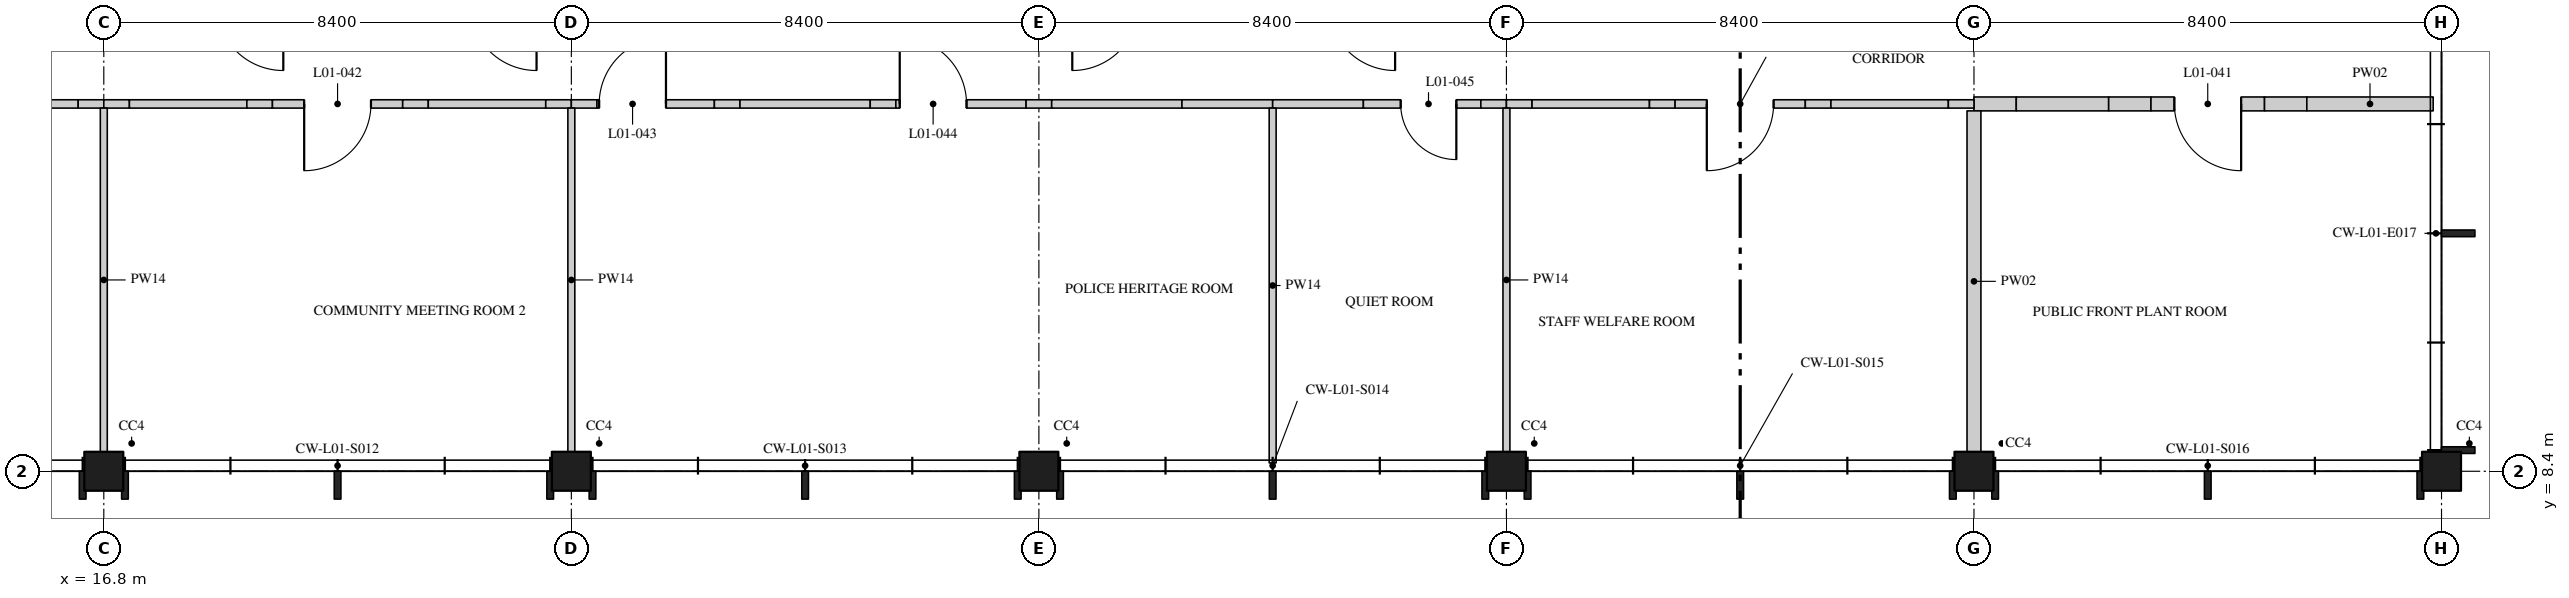
"""IFC4 building model, lengths in metres.
Left out: names, types, materials, properties, quantities, classifications, styles, units other than length and angle.
Written with IfcOpenShell. Run it as: python <this file> out.ifc"""

import sys

from ifc_helpers import new_model, si_unit, direction, frame, frame_2d, origin, origin_2d, place, context, subcontext, project, spatial, rectangle, extrude, element, fill, save


model = new_model("IFC4")
c1 = context("Model", 3, precision=1e-05, world=origin(), true_north=direction((0.0, 1.0)))
c2 = subcontext(c1, "Body", "Model", "MODEL_VIEW")
j1 = project(units=[si_unit("LENGTHUNIT", "METRE"), si_unit("PLANEANGLEUNIT", "RADIAN")], contexts=[c1])
p1 = place(None, origin())
s1 = spatial("IfcSite", under=j1, at=p1, CompositionType="ELEMENT")
p2 = place(p1, origin())
s2 = spatial("IfcBuilding", under=s1, at=p2, CompositionType="ELEMENT")
p3 = place(p2, frame((0.0, 0.0, 5.4)))
s3 = spatial("IfcBuildingStorey", under=s2, at=p3, CompositionType="ELEMENT", Elevation=5.4)
for number, where, z_axis, x_axis in (
    (1, (16.8, 8.4, 0.0), (0.0, 0.0, 1.0), (1.0, 0.0, 0.0)),
    (2, (25.2, 8.4, 0.0), (0.0, 0.0, 1.0), (1.0, 0.0, 0.0)),
    (3, (33.6, 8.4, 0.0), (0.0, 0.0, 1.0), (1.0, 0.0, 0.0)),
    (4, (42.0, 8.4, 0.0), (0.0, 0.0, 1.0), (1.0, 0.0, 0.0)),
    (5, (50.4, 8.4, 0.0), (0.0, 0.0, 1.0), (1.0, 0.0, 0.0)),
    (6, (58.8, 8.4, 0.0), (0.0, 0.0, 1.0), (1.0, 0.0, 0.0)),
):
    element("IfcColumn", number, at=place(p3, frame(where, z_axis=z_axis, x_axis=x_axis)), inside=s3, PredefinedType="COLUMN", context=c2, shape_type="SweptSolid", body=[
        extrude(rectangle(XDim=0.7, YDim=0.7, at=origin_2d()), origin(), (0.0, 0.0, 1.0), 4.37),
    ])
p4 = place(p3, frame((14.23, 15.0, 0.0), z_axis=(0.0, 0.0, 1.0), x_axis=(1.0, 0.0, 0.0)))
e7 = element("IfcWall", 7, at=p4, inside=s3, PredefinedType="PARTITIONING", context=c2, shape_type="SweptSolid", body=[
    extrude(rectangle(XDim=2.11, YDim=0.15, at=frame_2d((1.055, 0.0))), origin(), (0.0, 0.0, 1.0), 4.37),
])
p5 = place(p3, frame((16.34, 15.0, 0.0), z_axis=(0.0, 0.0, 1.0), x_axis=(1.0, 0.0, 0.0)))
e8 = element("IfcWall", 8, at=p5, inside=s3, PredefinedType="PARTITIONING", context=c2, shape_type="SweptSolid", body=[
    extrude(rectangle(XDim=0.46, YDim=0.15, at=frame_2d((0.23, 0.0))), origin(), (0.0, 0.0, 1.0), 3.746),
])
p6 = place(p3, frame((50.4, 15.0, 0.0), z_axis=(0.0, 0.0, 1.0), x_axis=(1.0, 0.0, 0.0)))
e9 = element("IfcWall", 9, at=p6, inside=s3, PredefinedType="PARTITIONING", context=c2, shape_type="SweptSolid", body=[
    extrude(rectangle(XDim=0.76, YDim=0.25, at=frame_2d((0.38, 0.0))), origin(), (0.0, 0.0, 1.0), 3.746),
])
p7 = place(p3, frame((51.16, 15.0, 0.0), z_axis=(0.0, 0.0, 1.0), x_axis=(1.0, 0.0, 0.0)))
e10 = element("IfcWall", 10, at=p7, inside=s3, PredefinedType="PARTITIONING", context=c2, shape_type="SweptSolid", body=[
    extrude(rectangle(XDim=1.66, YDim=0.25, at=frame_2d((0.83, 0.0))), origin(), (0.0, 0.0, 1.0), 4.37),
])
p8 = place(p3, frame((52.82, 15.0, 0.0), z_axis=(0.0, 0.0, 1.0), x_axis=(1.0, 0.0, 0.0)))
e11 = element("IfcWall", 11, at=p8, inside=s3, PredefinedType="PARTITIONING", context=c2, shape_type="SweptSolid", body=[
    extrude(rectangle(XDim=0.76, YDim=0.25, at=frame_2d((0.38, 0.0))), origin(), (0.0, 0.0, 1.0), 3.895),
])
p9 = place(p3, frame((53.58, 15.0, 0.0), z_axis=(0.0, 0.0, 1.0), x_axis=(1.0, 0.0, 0.0)))
e12 = element("IfcWall", 12, at=p9, inside=s3, PredefinedType="PARTITIONING", context=c2, shape_type="SweptSolid", body=[
    extrude(rectangle(XDim=2.04, YDim=0.25, at=frame_2d((1.02, 0.0))), origin(), (0.0, 0.0, 1.0), 4.37),
])
p10 = place(p9, frame((0.42, 0.0, 0.0)))
e13 = element("IfcOpeningElement", 13, at=p10, cuts=e12, PredefinedType="OPENING", context=c2, shape_type="SweptSolid", body=[
    extrude(rectangle(XDim=1.2, YDim=2.4, at=frame_2d((0.6, 1.2))), frame((0.0, 0.135, 0.0), z_axis=(0.0, -1.0, 0.0), x_axis=(1.0, 0.0, 0.0)), (0.0, 0.0, 1.0), 0.27),
])
p11 = place(p3, frame((55.62, 15.0, 0.0), z_axis=(0.0, 0.0, 1.0), x_axis=(1.0, 0.0, 0.0)))
e14 = element("IfcWall", 14, at=p11, inside=s3, PredefinedType="PARTITIONING", context=c2, shape_type="SweptSolid", body=[
    extrude(rectangle(XDim=0.76, YDim=0.25, at=frame_2d((0.38, 0.0))), origin(), (0.0, 0.0, 1.0), 3.895),
])
p12 = place(p3, frame((56.38, 15.0, 0.0), z_axis=(0.0, 0.0, 1.0), x_axis=(1.0, 0.0, 0.0)))
e15 = element("IfcWall", 15, at=p12, inside=s3, PredefinedType="PARTITIONING", context=c2, shape_type="SweptSolid", body=[
    extrude(rectangle(XDim=2.27, YDim=0.25, at=frame_2d((1.135, 0.0))), origin(), (0.0, 0.0, 1.0), 4.37),
])
p13 = place(p3, frame((16.8, 15.0, 0.0), z_axis=(0.0, 0.0, 1.0), x_axis=(1.0, 0.0, 0.0)))
e16 = element("IfcWall", 16, at=p13, inside=s3, PredefinedType="PARTITIONING", context=c2, shape_type="SweptSolid", body=[
    extrude(rectangle(XDim=0.46, YDim=0.15, at=frame_2d((0.23, 0.0))), origin(), (0.0, 0.0, 1.0), 3.746),
])
p14 = place(p3, frame((17.26, 15.0, 0.0), z_axis=(0.0, 0.0, 1.0), x_axis=(1.0, 0.0, 0.0)))
e17 = element("IfcWall", 17, at=p14, inside=s3, PredefinedType="PARTITIONING", context=c2, shape_type="SweptSolid", body=[
    extrude(rectangle(XDim=2.11, YDim=0.15, at=frame_2d((1.055, 0.0))), origin(), (0.0, 0.0, 1.0), 4.37),
])
p15 = place(p3, frame((19.37, 15.0, 0.0), z_axis=(0.0, 0.0, 1.0), x_axis=(1.0, 0.0, 0.0)))
e18 = element("IfcWall", 18, at=p15, inside=s3, PredefinedType="PARTITIONING", context=c2, shape_type="SweptSolid", body=[
    extrude(rectangle(XDim=0.46, YDim=0.15, at=frame_2d((0.23, 0.0))), origin(), (0.0, 0.0, 1.0), 3.895),
])
p16 = place(p3, frame((19.83, 15.0, 0.0), z_axis=(0.0, 0.0, 1.0), x_axis=(1.0, 0.0, 0.0)))
e19 = element("IfcWall", 19, at=p16, inside=s3, PredefinedType="PARTITIONING", context=c2, shape_type="SweptSolid", body=[
    extrude(rectangle(XDim=2.34, YDim=0.15, at=frame_2d((1.17, 0.0))), origin(), (0.0, 0.0, 1.0), 4.37),
])
p17 = place(p16, frame((0.57, 0.0, 0.0)))
e20 = element("IfcOpeningElement", 20, at=p17, cuts=e19, PredefinedType="OPENING", context=c2, shape_type="SweptSolid", body=[
    extrude(rectangle(XDim=1.2, YDim=2.4, at=frame_2d((0.6, 1.2))), frame((0.0, 0.085, 0.0), z_axis=(0.0, -1.0, 0.0), x_axis=(1.0, 0.0, 0.0)), (0.0, 0.0, 1.0), 0.17),
])
p18 = place(p3, frame((22.17, 15.0, 0.0), z_axis=(0.0, 0.0, 1.0), x_axis=(1.0, 0.0, 0.0)))
e21 = element("IfcWall", 21, at=p18, inside=s3, PredefinedType="PARTITIONING", context=c2, shape_type="SweptSolid", body=[
    extrude(rectangle(XDim=0.46, YDim=0.15, at=frame_2d((0.23, 0.0))), origin(), (0.0, 0.0, 1.0), 3.895),
])
p19 = place(p3, frame((22.63, 15.0, 0.0), z_axis=(0.0, 0.0, 1.0), x_axis=(1.0, 0.0, 0.0)))
e22 = element("IfcWall", 22, at=p19, inside=s3, PredefinedType="PARTITIONING", context=c2, shape_type="SweptSolid", body=[
    extrude(rectangle(XDim=2.11, YDim=0.15, at=frame_2d((1.055, 0.0))), origin(), (0.0, 0.0, 1.0), 4.37),
])
for number, where, z_axis, x_axis in (
    (23, (24.74, 15.0, 0.0), (0.0, 0.0, 1.0), (1.0, 0.0, 0.0)),
    (24, (25.2, 15.0, 0.0), (0.0, 0.0, 1.0), (1.0, 0.0, 0.0)),
):
    element("IfcWall", number, at=place(p3, frame(where, z_axis=z_axis, x_axis=x_axis)), inside=s3, PredefinedType="PARTITIONING", context=c2, shape_type="SweptSolid", body=[
        extrude(rectangle(XDim=0.46, YDim=0.15, at=frame_2d((0.23, 0.0))), origin(), (0.0, 0.0, 1.0), 3.746),
    ])
p20 = place(p3, frame((25.66, 15.0, 0.0), z_axis=(0.0, 0.0, 1.0), x_axis=(1.0, 0.0, 0.0)))
e25 = element("IfcWall", 25, at=p20, inside=s3, PredefinedType="PARTITIONING", context=c2, shape_type="SweptSolid", body=[
    extrude(rectangle(XDim=2.11, YDim=0.15, at=frame_2d((1.055, 0.0))), origin(), (0.0, 0.0, 1.0), 4.37),
])
p21 = place(p20, frame((0.04, 0.0, 0.0)))
e26 = element("IfcOpeningElement", 26, at=p21, cuts=e25, PredefinedType="OPENING", context=c2, shape_type="SweptSolid", body=[
    extrude(rectangle(XDim=1.2, YDim=2.4, at=frame_2d((0.6, 1.2))), frame((0.0, 0.085, 0.0), z_axis=(0.0, -1.0, 0.0), x_axis=(1.0, 0.0, 0.0)), (0.0, 0.0, 1.0), 0.17),
])
p22 = place(p3, frame((27.77, 15.0, 0.0), z_axis=(0.0, 0.0, 1.0), x_axis=(1.0, 0.0, 0.0)))
e27 = element("IfcWall", 27, at=p22, inside=s3, PredefinedType="PARTITIONING", context=c2, shape_type="SweptSolid", body=[
    extrude(rectangle(XDim=0.46, YDim=0.15, at=frame_2d((0.23, 0.0))), origin(), (0.0, 0.0, 1.0), 3.895),
])
p23 = place(p3, frame((28.23, 15.0, 0.0), z_axis=(0.0, 0.0, 1.0), x_axis=(1.0, 0.0, 0.0)))
e28 = element("IfcWall", 28, at=p23, inside=s3, PredefinedType="PARTITIONING", context=c2, shape_type="SweptSolid", body=[
    extrude(rectangle(XDim=2.34, YDim=0.15, at=frame_2d((1.17, 0.0))), origin(), (0.0, 0.0, 1.0), 4.37),
])
p24 = place(p3, frame((30.57, 15.0, 0.0), z_axis=(0.0, 0.0, 1.0), x_axis=(1.0, 0.0, 0.0)))
e29 = element("IfcWall", 29, at=p24, inside=s3, PredefinedType="PARTITIONING", context=c2, shape_type="SweptSolid", body=[
    extrude(rectangle(XDim=0.46, YDim=0.15, at=frame_2d((0.23, 0.0))), origin(), (0.0, 0.0, 1.0), 3.895),
])
p25 = place(p3, frame((31.03, 15.0, 0.0), z_axis=(0.0, 0.0, 1.0), x_axis=(1.0, 0.0, 0.0)))
e30 = element("IfcWall", 30, at=p25, inside=s3, PredefinedType="PARTITIONING", context=c2, shape_type="SweptSolid", body=[
    extrude(rectangle(XDim=2.34, YDim=0.15, at=frame_2d((1.17, 0.0))), origin(), (0.0, 0.0, 1.0), 4.37),
])
p26 = place(p25, frame((0.07, 0.0, 0.0)))
e31 = element("IfcOpeningElement", 31, at=p26, cuts=e30, PredefinedType="OPENING", context=c2, shape_type="SweptSolid", body=[
    extrude(rectangle(XDim=1.2, YDim=2.4, at=frame_2d((0.6, 1.2))), frame((0.0, 0.085, 0.0), z_axis=(0.0, -1.0, 0.0), x_axis=(1.0, 0.0, 0.0)), (0.0, 0.0, 1.0), 0.17),
])
p27 = place(p3, frame((33.37, 15.0, 0.0), z_axis=(0.0, 0.0, 1.0), x_axis=(1.0, 0.0, 0.0)))
e32 = element("IfcWall", 32, at=p27, inside=s3, PredefinedType="PARTITIONING", context=c2, shape_type="SweptSolid", body=[
    extrude(rectangle(XDim=0.46, YDim=0.15, at=frame_2d((0.23, 0.0))), origin(), (0.0, 0.0, 1.0), 3.746),
])
p28 = place(p3, frame((33.83, 15.0, 0.0), z_axis=(0.0, 0.0, 1.0), x_axis=(1.0, 0.0, 0.0)))
e33 = element("IfcWall", 33, at=p28, inside=s3, PredefinedType="PARTITIONING", context=c2, shape_type="SweptSolid", body=[
    extrude(rectangle(XDim=2.34, YDim=0.15, at=frame_2d((1.17, 0.0))), origin(), (0.0, 0.0, 1.0), 4.37),
])
p29 = place(p3, frame((36.17, 15.0, 0.0), z_axis=(0.0, 0.0, 1.0), x_axis=(1.0, 0.0, 0.0)))
e34 = element("IfcWall", 34, at=p29, inside=s3, PredefinedType="PARTITIONING", context=c2, shape_type="SweptSolid", body=[
    extrude(rectangle(XDim=1.63, YDim=0.15, at=frame_2d((0.815, 0.0))), origin(), (0.0, 0.0, 1.0), 3.895),
])
p30 = place(p3, frame((37.8, 15.0, 0.0), z_axis=(0.0, 0.0, 1.0), x_axis=(1.0, 0.0, 0.0)))
e35 = element("IfcWall", 35, at=p30, inside=s3, PredefinedType="PARTITIONING", context=c2, shape_type="SweptSolid", body=[
    extrude(rectangle(XDim=1.63, YDim=0.15, at=frame_2d((0.815, 0.0))), origin(), (0.0, 0.0, 1.0), 3.895),
])
p31 = place(p3, frame((39.43, 15.0, 0.0), z_axis=(0.0, 0.0, 1.0), x_axis=(1.0, 0.0, 0.0)))
e36 = element("IfcWall", 36, at=p31, inside=s3, PredefinedType="PARTITIONING", context=c2, shape_type="SweptSolid", body=[
    extrude(rectangle(XDim=2.11, YDim=0.15, at=frame_2d((1.055, 0.0))), origin(), (0.0, 0.0, 1.0), 4.37),
])
p32 = place(p31, frame((0.67, 0.0, 0.0)))
e37 = element("IfcOpeningElement", 37, at=p32, cuts=e36, PredefinedType="OPENING", context=c2, shape_type="SweptSolid", body=[
    extrude(rectangle(XDim=1.0, YDim=2.1, at=frame_2d((0.5, 1.05))), frame((0.0, 0.085, 0.0), z_axis=(0.0, -1.0, 0.0), x_axis=(1.0, 0.0, 0.0)), (0.0, 0.0, 1.0), 0.17),
])
for number, where, z_axis, x_axis in (
    (38, (41.54, 15.0, 0.0), (0.0, 0.0, 1.0), (1.0, 0.0, 0.0)),
    (39, (42.0, 15.0, 0.0), (0.0, 0.0, 1.0), (1.0, 0.0, 0.0)),
):
    element("IfcWall", number, at=place(p3, frame(where, z_axis=z_axis, x_axis=x_axis)), inside=s3, PredefinedType="PARTITIONING", context=c2, shape_type="SweptSolid", body=[
        extrude(rectangle(XDim=0.46, YDim=0.15, at=frame_2d((0.23, 0.0))), origin(), (0.0, 0.0, 1.0), 3.746),
    ])
p33 = place(p3, frame((42.46, 15.0, 0.0), z_axis=(0.0, 0.0, 1.0), x_axis=(1.0, 0.0, 0.0)))
e40 = element("IfcWall", 40, at=p33, inside=s3, PredefinedType="PARTITIONING", context=c2, shape_type="SweptSolid", body=[
    extrude(rectangle(XDim=2.11, YDim=0.15, at=frame_2d((1.055, 0.0))), origin(), (0.0, 0.0, 1.0), 4.37),
])
p34 = place(p3, frame((44.57, 15.0, 0.0), z_axis=(0.0, 0.0, 1.0), x_axis=(1.0, 0.0, 0.0)))
e41 = element("IfcWall", 41, at=p34, inside=s3, PredefinedType="PARTITIONING", context=c2, shape_type="SweptSolid", body=[
    extrude(rectangle(XDim=0.46, YDim=0.15, at=frame_2d((0.23, 0.0))), origin(), (0.0, 0.0, 1.0), 3.895),
])
p35 = place(p3, frame((45.03, 15.0, 0.0), z_axis=(0.0, 0.0, 1.0), x_axis=(1.0, 0.0, 0.0)))
e42 = element("IfcWall", 42, at=p35, inside=s3, PredefinedType="PARTITIONING", context=c2, shape_type="SweptSolid", body=[
    extrude(rectangle(XDim=2.34, YDim=0.15, at=frame_2d((1.17, 0.0))), origin(), (0.0, 0.0, 1.0), 4.37),
])
p36 = place(p35, frame((0.57, 0.0, 0.0)))
e43 = element("IfcOpeningElement", 43, at=p36, cuts=e42, PredefinedType="OPENING", context=c2, shape_type="SweptSolid", body=[
    extrude(rectangle(XDim=1.2, YDim=2.4, at=frame_2d((0.6, 1.2))), frame((0.0, 0.085, 0.0), z_axis=(0.0, -1.0, 0.0), x_axis=(1.0, 0.0, 0.0)), (0.0, 0.0, 1.0), 0.17),
])
p37 = place(p3, frame((47.37, 15.0, 0.0), z_axis=(0.0, 0.0, 1.0), x_axis=(1.0, 0.0, 0.0)))
e44 = element("IfcWall", 44, at=p37, inside=s3, PredefinedType="PARTITIONING", context=c2, shape_type="SweptSolid", body=[
    extrude(rectangle(XDim=0.46, YDim=0.15, at=frame_2d((0.23, 0.0))), origin(), (0.0, 0.0, 1.0), 3.895),
])
p38 = place(p3, frame((47.83, 15.0, 0.0), z_axis=(0.0, 0.0, 1.0), x_axis=(1.0, 0.0, 0.0)))
e45 = element("IfcWall", 45, at=p38, inside=s3, PredefinedType="PARTITIONING", context=c2, shape_type="SweptSolid", body=[
    extrude(rectangle(XDim=2.11, YDim=0.15, at=frame_2d((1.055, 0.0))), origin(), (0.0, 0.0, 1.0), 4.37),
])
p39 = place(p3, frame((49.94, 15.0, 0.0), z_axis=(0.0, 0.0, 1.0), x_axis=(1.0, 0.0, 0.0)))
e46 = element("IfcWall", 46, at=p39, inside=s3, PredefinedType="PARTITIONING", context=c2, shape_type="SweptSolid", body=[
    extrude(rectangle(XDim=0.46, YDim=0.15, at=frame_2d((0.23, 0.0))), origin(), (0.0, 0.0, 1.0), 3.746),
])
p40 = place(p3, frame((16.8, 8.75, 0.0), z_axis=(0.0, 0.0, 1.0), x_axis=(0.0, 1.0, 0.0)))
e47 = element("IfcWall", 47, at=p40, inside=s3, PredefinedType="PARTITIONING", context=c2, shape_type="SweptSolid", body=[
    extrude(rectangle(XDim=6.175, YDim=0.125, at=frame_2d((3.087, 0.0))), origin(), (0.0, 0.0, 1.0), 3.746),
])
p41 = place(p3, frame((50.4, 8.75, 0.0), z_axis=(0.0, 0.0, 1.0), x_axis=(0.0, 1.0, 0.0)))
e48 = element("IfcWall", 48, at=p41, inside=s3, PredefinedType="PARTITIONING", context=c2, shape_type="SweptSolid", body=[
    extrude(rectangle(XDim=6.125, YDim=0.25, at=frame_2d((3.062, 0.0))), origin(), (0.0, 0.0, 1.0), 3.746),
])
p42 = place(p3, frame((25.2, 8.75, 0.0), z_axis=(0.0, 0.0, 1.0), x_axis=(0.0, 1.0, 0.0)))
e49 = element("IfcWall", 49, at=p42, inside=s3, PredefinedType="PARTITIONING", context=c2, shape_type="SweptSolid", body=[
    extrude(rectangle(XDim=6.175, YDim=0.125, at=frame_2d((3.087, 0.0))), origin(), (0.0, 0.0, 1.0), 3.746),
])
p43 = place(p3, frame((37.8, 8.55, 0.0), z_axis=(0.0, 0.0, 1.0), x_axis=(0.0, 1.0, 0.0)))
e50 = element("IfcWall", 50, at=p43, inside=s3, PredefinedType="PARTITIONING", context=c2, shape_type="SweptSolid", body=[
    extrude(rectangle(XDim=6.375, YDim=0.125, at=frame_2d((3.188, 0.0))), origin(), (0.0, 0.0, 1.0), 4.37),
])
p44 = place(p3, frame((42.0, 8.75, 0.0), z_axis=(0.0, 0.0, 1.0), x_axis=(0.0, 1.0, 0.0)))
e51 = element("IfcWall", 51, at=p44, inside=s3, PredefinedType="PARTITIONING", context=c2, shape_type="SweptSolid", body=[
    extrude(rectangle(XDim=6.175, YDim=0.125, at=frame_2d((3.087, 0.0))), origin(), (0.0, 0.0, 1.0), 3.746),
])
p45 = place(p10, frame((1.2, 0.0, 0.0), z_axis=(0.0, 0.0, 1.0), x_axis=(-1.0, 0.0, 0.0)))
e52 = element("IfcDoor", 52, at=p45, inside=s3, OperationType="SINGLE_SWING_RIGHT", PredefinedType="DOOR", context=c2, shape_type="SweptSolid", body=[
    extrude(rectangle(XDim=1.2, YDim=2.4, at=frame_2d((0.6, 1.2))), frame((0.0, 0.05, 0.0), z_axis=(0.0, -1.0, 0.0), x_axis=(1.0, 0.0, 0.0)), (0.0, 0.0, 1.0), 0.1),
])
fill(e13, e52)
p46 = place(p17, frame((1.2, 0.0, 0.0), z_axis=(0.0, 0.0, 1.0), x_axis=(-1.0, 0.0, 0.0)))
e53 = element("IfcDoor", 53, at=p46, inside=s3, OperationType="SINGLE_SWING_LEFT", PredefinedType="DOOR", context=c2, shape_type="SweptSolid", body=[
    extrude(rectangle(XDim=1.2, YDim=2.4, at=frame_2d((0.6, 1.2))), frame((0.0, 0.025, 0.0), z_axis=(0.0, -1.0, 0.0), x_axis=(1.0, 0.0, 0.0)), (0.0, 0.0, 1.0), 0.05),
])
fill(e20, e53)
p47 = place(p21, origin())
e54 = element("IfcDoor", 54, at=p47, inside=s3, OperationType="SINGLE_SWING_LEFT", PredefinedType="DOOR", context=c2, shape_type="SweptSolid", body=[
    extrude(rectangle(XDim=1.2, YDim=2.4, at=frame_2d((0.6, 1.2))), frame((0.0, 0.025, 0.0), z_axis=(0.0, -1.0, 0.0), x_axis=(1.0, 0.0, 0.0)), (0.0, 0.0, 1.0), 0.05),
])
fill(e26, e54)
p48 = place(p26, origin())
e55 = element("IfcDoor", 55, at=p48, inside=s3, OperationType="SINGLE_SWING_RIGHT", PredefinedType="DOOR", context=c2, shape_type="SweptSolid", body=[
    extrude(rectangle(XDim=1.2, YDim=2.4, at=frame_2d((0.6, 1.2))), frame((0.0, 0.025, 0.0), z_axis=(0.0, -1.0, 0.0), x_axis=(1.0, 0.0, 0.0)), (0.0, 0.0, 1.0), 0.05),
])
fill(e31, e55)
p49 = place(p32, frame((1.0, 0.0, 0.0), z_axis=(0.0, 0.0, 1.0), x_axis=(-1.0, 0.0, 0.0)))
e56 = element("IfcDoor", 56, at=p49, inside=s3, OperationType="SINGLE_SWING_RIGHT", PredefinedType="DOOR", context=c2, shape_type="SweptSolid", body=[
    extrude(rectangle(XDim=1.0, YDim=2.1, at=frame_2d((0.5, 1.05))), frame((0.0, 0.025, 0.0), z_axis=(0.0, -1.0, 0.0), x_axis=(1.0, 0.0, 0.0)), (0.0, 0.0, 1.0), 0.05),
])
fill(e37, e56)
p50 = place(p36, frame((1.2, 0.0, 0.0), z_axis=(0.0, 0.0, 1.0), x_axis=(-1.0, 0.0, 0.0)))
e57 = element("IfcDoor", 57, at=p50, inside=s3, OperationType="SINGLE_SWING_LEFT", PredefinedType="DOOR", context=c2, shape_type="SweptSolid", body=[
    extrude(rectangle(XDim=1.2, YDim=2.4, at=frame_2d((0.6, 1.2))), frame((0.0, 0.025, 0.0), z_axis=(0.0, -1.0, 0.0), x_axis=(1.0, 0.0, 0.0)), (0.0, 0.0, 1.0), 0.05),
])
fill(e43, e57)
save(model, sys.argv[1])
